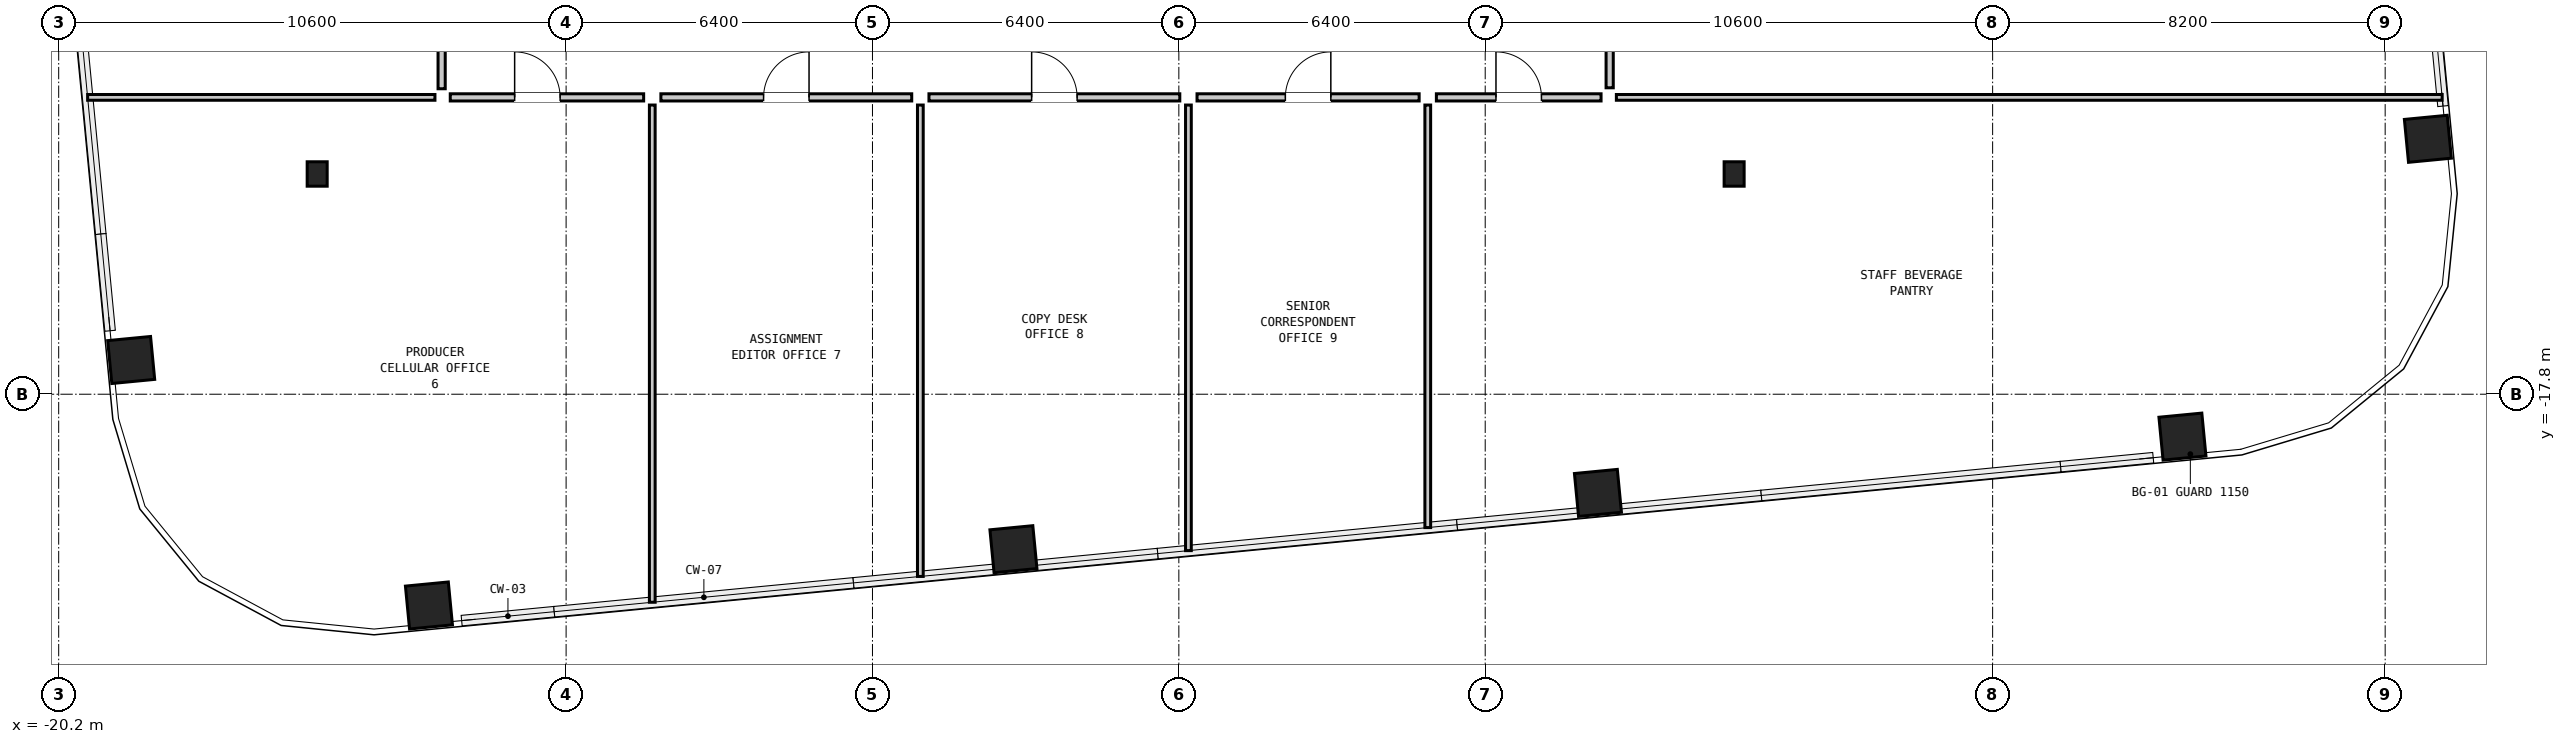
"""IFC4 building model, lengths in metres.
Left out: names, types, materials, properties, quantities, classifications, styles, units other than length and angle.
Written with IfcOpenShell. Run it as: python <this file> out.ifc"""

import sys

from ifc_helpers import new_model, si_unit, direction, frame, frame_2d, origin, origin_2d, place, context, subcontext, project, spatial, rectangle, hollow_rectangle, i_section, extrude, element, fill, save


model = new_model("IFC4")
c1 = context("Model", 3, precision=1e-05, world=origin(), true_north=direction((0.0, 1.0)))
c2 = subcontext(c1, "Body", "Model", "MODEL_VIEW")
j1 = project(units=[si_unit("LENGTHUNIT", "METRE"), si_unit("PLANEANGLEUNIT", "RADIAN")], contexts=[c1])
p1 = place(None, origin())
s1 = spatial("IfcSite", under=j1, at=p1, CompositionType="ELEMENT")
p2 = place(p1, origin())
s2 = spatial("IfcBuilding", under=s1, at=p2, CompositionType="ELEMENT")
p3 = place(p2, frame((0.0, 0.0, 78.6)))
s3 = spatial("IfcBuildingStorey", under=s2, at=p3, CompositionType="ELEMENT", Elevation=78.6)
for number, where, z_axis, x_axis in (
    (1, (-12.465, -22.213, 0.0), (0.0, 0.0, 1.0), (0.995, 0.096, 0.0)),
    (2, (-0.255, -21.037, 0.0), (0.0, 0.0, 1.0), (0.995, 0.096, 0.0)),
    (3, (11.955, -19.861, 0.0), (0.0, 0.0, 1.0), (0.995, 0.096, 0.0)),
    (4, (24.165, -18.686, 0.0), (0.0, 0.0, 1.0), (0.995, 0.096, 0.0)),
    (5, (29.292, -12.465, 0.0), (0.0, 0.0, 1.0), (-0.096, 0.995, 0.0)),
    (6, (-18.686, -17.085, 0.0), (0.0, 0.0, 1.0), (-0.096, 0.995, 0.0)),
):
    element("IfcColumn", number, at=place(p3, frame(where, z_axis=z_axis, x_axis=x_axis)), inside=s3, PredefinedType="COLUMN", context=c2, shape_type="SweptSolid", body=[
        extrude(hollow_rectangle(XDim=0.9, YDim=0.9, WallThickness=0.055, at=origin_2d()), origin(), (0.0, 0.0, 1.0), 3.05),
    ])
for number, where, z_axis, x_axis in (
    (7, (-14.8, -13.2, 0.0), (0.0, 0.0, 1.0), (1.0, 0.0, 0.0)),
    (8, (14.8, -13.2, 0.0), (0.0, 0.0, 1.0), (1.0, 0.0, 0.0)),
):
    element("IfcColumn", number, at=place(p3, frame(where, z_axis=z_axis, x_axis=x_axis)), inside=s3, PredefinedType="COLUMN", context=c2, shape_type="SweptSolid", body=[
        extrude(i_section(OverallWidth=0.418, OverallDepth=0.51, WebThickness=0.042, FlangeThickness=0.068, at=origin_2d()), origin(), (0.0, 0.0, 1.0), 3.05),
    ])
p4 = place(p3, frame((-19.595, -11.6, 0.0), z_axis=(0.0, 0.0, 1.0), x_axis=(1.0, 0.0, 0.0)))
e9 = element("IfcWall", 9, at=p4, inside=s3, PredefinedType="PARTITIONING", context=c2, shape_type="SweptSolid", body=[
    extrude(rectangle(XDim=7.255, YDim=0.12, at=frame_2d((3.628, 0.0))), origin(), (0.0, 0.0, 1.0), 2.274),
])
p5 = place(p3, frame((12.34, -11.6, 0.0), z_axis=(0.0, 0.0, 1.0), x_axis=(1.0, 0.0, 0.0)))
e10 = element("IfcWall", 10, at=p5, inside=s3, PredefinedType="PARTITIONING", context=c2, shape_type="SweptSolid", body=[
    extrude(rectangle(XDim=17.251, YDim=0.12, at=frame_2d((8.625, 0.0))), origin(), (0.0, 0.0, 1.0), 2.274),
])
p6 = place(p3, frame((-7.8, -22.145, 0.0), z_axis=(0.0, 0.0, 1.0), x_axis=(0.0, 1.0, 0.0)))
e11 = element("IfcWall", 11, at=p6, inside=s3, PredefinedType="PARTITIONING", context=c2, shape_type="SweptSolid", body=[
    extrude(rectangle(XDim=10.385, YDim=0.12, at=frame_2d((5.192, 0.0))), origin(), (0.0, 0.0, 1.0), 2.83),
])
p7 = place(p3, frame((-2.2, -21.606, 0.0), z_axis=(0.0, 0.0, 1.0), x_axis=(0.0, 1.0, 0.0)))
e12 = element("IfcWall", 12, at=p7, inside=s3, PredefinedType="PARTITIONING", context=c2, shape_type="SweptSolid", body=[
    extrude(rectangle(XDim=9.846, YDim=0.12, at=frame_2d((4.923, 0.0))), origin(), (0.0, 0.0, 1.0), 2.83),
])
p8 = place(p3, frame((3.4, -21.067, 0.0), z_axis=(0.0, 0.0, 1.0), x_axis=(0.0, 1.0, 0.0)))
e13 = element("IfcWall", 13, at=p8, inside=s3, PredefinedType="PARTITIONING", context=c2, shape_type="SweptSolid", body=[
    extrude(rectangle(XDim=9.307, YDim=0.12, at=frame_2d((4.653, 0.0))), origin(), (0.0, 0.0, 1.0), 2.274),
])
p9 = place(p3, frame((8.4, -20.585, 0.0), z_axis=(0.0, 0.0, 1.0), x_axis=(0.0, 1.0, 0.0)))
e14 = element("IfcWall", 14, at=p9, inside=s3, PredefinedType="PARTITIONING", context=c2, shape_type="SweptSolid", body=[
    extrude(rectangle(XDim=8.825, YDim=0.12, at=frame_2d((4.413, 0.0))), origin(), (0.0, 0.0, 1.0), 2.83),
])
p10 = place(p3, frame((-12.02, -11.6, 0.0), z_axis=(0.0, 0.0, 1.0), x_axis=(1.0, 0.0, 0.0)))
e15 = element("IfcWall", 15, at=p10, inside=s3, PredefinedType="PARTITIONING", context=c2, shape_type="SweptSolid", body=[
    extrude(rectangle(XDim=4.04, YDim=0.15, at=frame_2d((2.02, 0.0))), origin(), (0.0, 0.0, 1.0), 2.274),
])
p11 = place(p10, frame((1.345, 0.0, 0.0)))
e16 = element("IfcOpeningElement", 16, at=p11, cuts=e15, PredefinedType="OPENING", context=c2, shape_type="SweptSolid", body=[
    extrude(rectangle(XDim=0.95, YDim=2.1, at=frame_2d((0.475, 1.05))), frame((0.0, 0.087, 0.0), z_axis=(0.0, -1.0, 0.0), x_axis=(1.0, 0.0, 0.0)), (0.0, 0.0, 1.0), 0.174),
])
p12 = place(p3, frame((-7.62, -11.6, 0.0), z_axis=(0.0, 0.0, 1.0), x_axis=(1.0, 0.0, 0.0)))
e17 = element("IfcWall", 17, at=p12, inside=s3, PredefinedType="PARTITIONING", context=c2, shape_type="SweptSolid", body=[
    extrude(rectangle(XDim=5.24, YDim=0.15, at=frame_2d((2.62, 0.0))), origin(), (0.0, 0.0, 1.0), 2.83),
])
p13 = place(p12, frame((2.145, 0.0, 0.0)))
e18 = element("IfcOpeningElement", 18, at=p13, cuts=e17, PredefinedType="OPENING", context=c2, shape_type="SweptSolid", body=[
    extrude(rectangle(XDim=0.95, YDim=2.1, at=frame_2d((0.475, 1.05))), frame((0.0, 0.087, 0.0), z_axis=(0.0, -1.0, 0.0), x_axis=(1.0, 0.0, 0.0)), (0.0, 0.0, 1.0), 0.174),
])
p14 = place(p3, frame((-2.02, -11.6, 0.0), z_axis=(0.0, 0.0, 1.0), x_axis=(1.0, 0.0, 0.0)))
e19 = element("IfcWall", 19, at=p14, inside=s3, PredefinedType="PARTITIONING", context=c2, shape_type="SweptSolid", body=[
    extrude(rectangle(XDim=5.24, YDim=0.15, at=frame_2d((2.62, 0.0))), origin(), (0.0, 0.0, 1.0), 2.83),
])
p15 = place(p14, frame((2.145, 0.0, 0.0)))
e20 = element("IfcOpeningElement", 20, at=p15, cuts=e19, PredefinedType="OPENING", context=c2, shape_type="SweptSolid", body=[
    extrude(rectangle(XDim=0.95, YDim=2.1, at=frame_2d((0.475, 1.05))), frame((0.0, 0.087, 0.0), z_axis=(0.0, -1.0, 0.0), x_axis=(1.0, 0.0, 0.0)), (0.0, 0.0, 1.0), 0.174),
])
p16 = place(p3, frame((3.58, -11.6, 0.0), z_axis=(0.0, 0.0, 1.0), x_axis=(1.0, 0.0, 0.0)))
e21 = element("IfcWall", 21, at=p16, inside=s3, PredefinedType="PARTITIONING", context=c2, shape_type="SweptSolid", body=[
    extrude(rectangle(XDim=4.64, YDim=0.15, at=frame_2d((2.32, 0.0))), origin(), (0.0, 0.0, 1.0), 2.83),
])
p17 = place(p16, frame((1.845, 0.0, 0.0)))
e22 = element("IfcOpeningElement", 22, at=p17, cuts=e21, PredefinedType="OPENING", context=c2, shape_type="SweptSolid", body=[
    extrude(rectangle(XDim=0.95, YDim=2.1, at=frame_2d((0.475, 1.05))), frame((0.0, 0.087, 0.0), z_axis=(0.0, -1.0, 0.0), x_axis=(1.0, 0.0, 0.0)), (0.0, 0.0, 1.0), 0.174),
])
p18 = place(p3, frame((8.58, -11.6, 0.0), z_axis=(0.0, 0.0, 1.0), x_axis=(1.0, 0.0, 0.0)))
e23 = element("IfcWall", 23, at=p18, inside=s3, PredefinedType="PARTITIONING", context=c2, shape_type="SweptSolid", body=[
    extrude(rectangle(XDim=3.44, YDim=0.15, at=frame_2d((1.72, 0.0))), origin(), (0.0, 0.0, 1.0), 2.274),
])
p19 = place(p18, frame((1.245, 0.0, 0.0)))
e24 = element("IfcOpeningElement", 24, at=p19, cuts=e23, PredefinedType="OPENING", context=c2, shape_type="SweptSolid", body=[
    extrude(rectangle(XDim=0.95, YDim=2.1, at=frame_2d((0.475, 1.05))), frame((0.0, 0.087, 0.0), z_axis=(0.0, -1.0, 0.0), x_axis=(1.0, 0.0, 0.0)), (0.0, 0.0, 1.0), 0.174),
])
p20 = place(p3, frame((-12.2, -11.42, 0.0), z_axis=(0.0, 0.0, 1.0), x_axis=(0.0, 1.0, 0.0)))
e25 = element("IfcWall", 25, at=p20, inside=s3, PredefinedType="PARTITIONING", context=c2, shape_type="SweptSolid", body=[
    extrude(rectangle(XDim=11.24, YDim=0.15, at=frame_2d((5.62, 0.0))), origin(), (0.0, 0.0, 1.0), 2.83),
])
p21 = place(p20, frame((5.145, 0.0, 0.0)))
e26 = element("IfcOpeningElement", 26, at=p21, cuts=e25, PredefinedType="OPENING", context=c2, shape_type="SweptSolid", body=[
    extrude(rectangle(XDim=0.95, YDim=2.1, at=frame_2d((0.475, 1.05))), frame((0.0, 0.087, 0.0), z_axis=(0.0, -1.0, 0.0), x_axis=(1.0, 0.0, 0.0)), (0.0, 0.0, 1.0), 0.174),
])
p22 = place(p3, frame((12.2, -11.4, 0.0), z_axis=(0.0, 0.0, 1.0), x_axis=(0.0, 1.0, 0.0)))
e27 = element("IfcWall", 27, at=p22, inside=s3, PredefinedType="PARTITIONING", context=c2, shape_type="SweptSolid", body=[
    extrude(rectangle(XDim=8.84, YDim=0.15, at=frame_2d((4.42, 0.0))), origin(), (0.0, 0.0, 1.0), 2.83),
])
p23 = place(p22, frame((3.945, 0.0, 0.0)))
e28 = element("IfcOpeningElement", 28, at=p23, cuts=e27, PredefinedType="OPENING", context=c2, shape_type="SweptSolid", body=[
    extrude(rectangle(XDim=0.95, YDim=2.1, at=frame_2d((0.475, 1.05))), frame((0.0, 0.087, 0.0), z_axis=(0.0, -1.0, 0.0), x_axis=(1.0, 0.0, 0.0)), (0.0, 0.0, 1.0), 0.174),
])
p24 = place(p11, origin())
e29 = element("IfcDoor", 29, at=p24, inside=s3, OperationType="SINGLE_SWING_LEFT", PredefinedType="DOOR", context=c2, shape_type="SweptSolid", body=[
    extrude(rectangle(XDim=0.95, YDim=2.1, at=frame_2d((0.475, 1.05))), frame((0.0, 0.025, 0.0), z_axis=(0.0, -1.0, 0.0), x_axis=(1.0, 0.0, 0.0)), (0.0, 0.0, 1.0), 0.05),
])
fill(e16, e29)
p25 = place(p13, origin())
e30 = element("IfcDoor", 30, at=p25, inside=s3, OperationType="SINGLE_SWING_RIGHT", PredefinedType="DOOR", context=c2, shape_type="SweptSolid", body=[
    extrude(rectangle(XDim=0.95, YDim=2.1, at=frame_2d((0.475, 1.05))), frame((0.0, 0.025, 0.0), z_axis=(0.0, -1.0, 0.0), x_axis=(1.0, 0.0, 0.0)), (0.0, 0.0, 1.0), 0.05),
])
fill(e18, e30)
p26 = place(p15, origin())
e31 = element("IfcDoor", 31, at=p26, inside=s3, OperationType="SINGLE_SWING_LEFT", PredefinedType="DOOR", context=c2, shape_type="SweptSolid", body=[
    extrude(rectangle(XDim=0.95, YDim=2.1, at=frame_2d((0.475, 1.05))), frame((0.0, 0.025, 0.0), z_axis=(0.0, -1.0, 0.0), x_axis=(1.0, 0.0, 0.0)), (0.0, 0.0, 1.0), 0.05),
])
fill(e20, e31)
p27 = place(p17, origin())
e32 = element("IfcDoor", 32, at=p27, inside=s3, OperationType="SINGLE_SWING_RIGHT", PredefinedType="DOOR", context=c2, shape_type="SweptSolid", body=[
    extrude(rectangle(XDim=0.95, YDim=2.1, at=frame_2d((0.475, 1.05))), frame((0.0, 0.025, 0.0), z_axis=(0.0, -1.0, 0.0), x_axis=(1.0, 0.0, 0.0)), (0.0, 0.0, 1.0), 0.05),
])
fill(e22, e32)
p28 = place(p19, origin())
e33 = element("IfcDoor", 33, at=p28, inside=s3, OperationType="SINGLE_SWING_LEFT", PredefinedType="DOOR", context=c2, shape_type="SweptSolid", body=[
    extrude(rectangle(XDim=0.95, YDim=2.1, at=frame_2d((0.475, 1.05))), frame((0.0, 0.025, 0.0), z_axis=(0.0, -1.0, 0.0), x_axis=(1.0, 0.0, 0.0)), (0.0, 0.0, 1.0), 0.05),
])
fill(e24, e33)
save(model, sys.argv[1])
